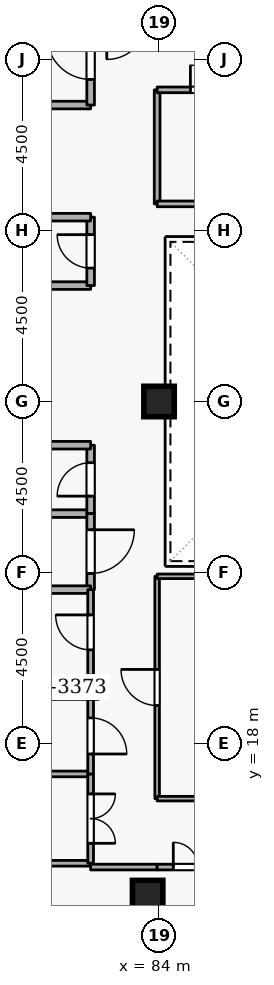
"""IFC4 building model, lengths in metres.
Left out: names, types, materials, properties, quantities, classifications, styles, units other than length and angle.
Written with IfcOpenShell. Run it as: python <this file> out.ifc"""

import sys

from ifc_helpers import new_model, si_unit, direction, frame, frame_2d, origin, origin_2d, place, context, subcontext, project, spatial, rectangle, extrude, element, fill, save


model = new_model("IFC4")
c1 = context("Model", 3, precision=1e-05, world=origin(), true_north=direction((0.0, 1.0)))
c2 = subcontext(c1, "Body", "Model", "MODEL_VIEW")
j1 = project(units=[si_unit("LENGTHUNIT", "METRE"), si_unit("PLANEANGLEUNIT", "RADIAN")], contexts=[c1])
p1 = place(None, origin())
s1 = spatial("IfcSite", under=j1, at=p1, CompositionType="ELEMENT")
p2 = place(p1, origin())
s2 = spatial("IfcBuilding", under=s1, at=p2, CompositionType="ELEMENT")
p3 = place(p2, frame((0.0, 0.0, 272.7)))
s3 = spatial("IfcBuildingStorey", under=s2, at=p3, CompositionType="ELEMENT", Elevation=272.7)
p4 = place(p3, frame((76.6, 19.45, 0.0), z_axis=(0.0, 0.0, 1.0), x_axis=(1.0, 0.0, 0.0)))
e1 = element("IfcWall", 1, at=p4, inside=s3, PredefinedType="SHEAR", context=c2, shape_type="SweptSolid", body=[
    extrude(rectangle(XDim=5.8, YDim=0.5, at=frame_2d((2.9, 0.0))), origin(), (0.0, 0.0, 1.0), 3.6),
])
for number, where, z_axis, x_axis in (
    (2, (83.7, 14.0, 0.0), (0.0, 0.0, 1.0), (1.0, 0.0, 0.0)),
    (3, (84.0, 27.0, 0.0), (0.0, 0.0, 1.0), (1.0, 0.0, 0.0)),
):
    element("IfcColumn", number, at=place(p3, frame(where, z_axis=z_axis, x_axis=x_axis)), inside=s3, PredefinedType="COLUMN", context=c2, shape_type="SweptSolid", body=[
        extrude(rectangle(XDim=0.8, YDim=0.8, at=origin_2d()), origin(), (0.0, 0.0, 1.0), 3.6),
    ])
p5 = place(p3, frame((79.9, 34.8, 0.0), z_axis=(0.0, 0.0, 1.0), x_axis=(1.0, 0.0, 0.0)))
e4 = element("IfcWall", 4, at=p5, inside=s3, PredefinedType="STANDARD", context=c2, shape_type="SweptSolid", body=[
    extrude(rectangle(XDim=2.3, YDim=0.2, at=frame_2d((1.15, 0.0))), origin(), (0.0, 0.0, 1.0), 2.545),
])
p6 = place(p3, frame((82.2, 34.8, 0.0), z_axis=(0.0, 0.0, 1.0), x_axis=(0.0, 1.0, 0.0)))
e5 = element("IfcWall", 5, at=p6, inside=s3, PredefinedType="STANDARD", context=c2, shape_type="SweptSolid", body=[
    extrude(rectangle(XDim=2.5, YDim=0.2, at=frame_2d((1.25, 0.0))), origin(), (0.0, 0.0, 1.0), 3.34),
])
p7 = place(p6, frame((0.675, 0.0, 0.0)))
e6 = element("IfcOpeningElement", 6, at=p7, cuts=e5, PredefinedType="OPENING", context=c2, shape_type="SweptSolid", body=[
    extrude(rectangle(XDim=1.15, YDim=2.1, at=frame_2d((0.575, 1.05))), frame((0.0, 0.11, 0.0), z_axis=(0.0, -1.0, 0.0), x_axis=(1.0, 0.0, 0.0)), (0.0, 0.0, 1.0), 0.22),
])
p8 = place(p3, frame((80.15, 24.05, 0.0), z_axis=(0.0, 0.0, 1.0), x_axis=(1.0, 0.0, 0.0)))
e7 = element("IfcWall", 7, at=p8, inside=s3, PredefinedType="STANDARD", context=c2, shape_type="SweptSolid", body=[
    extrude(rectangle(XDim=2.05, YDim=0.2, at=frame_2d((1.025, 0.0))), origin(), (0.0, 0.0, 1.0), 3.34),
])
p9 = place(p3, frame((82.2, 24.05, 0.0), z_axis=(0.0, 0.0, 1.0), x_axis=(0.0, 1.0, 0.0)))
e8 = element("IfcWall", 8, at=p9, inside=s3, PredefinedType="STANDARD", context=c2, shape_type="SweptSolid", body=[
    extrude(rectangle(XDim=1.8, YDim=0.2, at=frame_2d((0.9, 0.0))), origin(), (0.0, 0.0, 1.0), 3.34),
])
p10 = place(p9, frame((0.46, 0.0, 0.0)))
e9 = element("IfcOpeningElement", 9, at=p10, cuts=e8, PredefinedType="OPENING", context=c2, shape_type="SweptSolid", body=[
    extrude(rectangle(XDim=0.88, YDim=2.04, at=frame_2d((0.44, 1.02))), frame((0.0, 0.11, 0.0), z_axis=(0.0, -1.0, 0.0), x_axis=(1.0, 0.0, 0.0)), (0.0, 0.0, 1.0), 0.22),
])
for number, where, z_axis, x_axis in (
    (10, (82.2, 25.85, 0.0), (0.0, 0.0, 1.0), (-1.0, 0.0, 0.0)),
    (11, (80.15, 30.05, 0.0), (0.0, 0.0, 1.0), (1.0, 0.0, 0.0)),
):
    element("IfcWall", number, at=place(p3, frame(where, z_axis=z_axis, x_axis=x_axis)), inside=s3, PredefinedType="STANDARD", context=c2, shape_type="SweptSolid", body=[
        extrude(rectangle(XDim=2.05, YDim=0.2, at=frame_2d((1.025, 0.0))), origin(), (0.0, 0.0, 1.0), 3.34),
    ])
p11 = place(p3, frame((82.2, 30.05, 0.0), z_axis=(0.0, 0.0, 1.0), x_axis=(0.0, 1.0, 0.0)))
e12 = element("IfcWall", 12, at=p11, inside=s3, PredefinedType="STANDARD", context=c2, shape_type="SweptSolid", body=[
    extrude(rectangle(XDim=1.8, YDim=0.2, at=frame_2d((0.9, 0.0))), origin(), (0.0, 0.0, 1.0), 3.34),
])
p12 = place(p11, frame((0.46, 0.0, 0.0)))
e13 = element("IfcOpeningElement", 13, at=p12, cuts=e12, PredefinedType="OPENING", context=c2, shape_type="SweptSolid", body=[
    extrude(rectangle(XDim=0.88, YDim=2.04, at=frame_2d((0.44, 1.02))), frame((0.0, 0.11, 0.0), z_axis=(0.0, -1.0, 0.0), x_axis=(1.0, 0.0, 0.0)), (0.0, 0.0, 1.0), 0.22),
])
p13 = place(p3, frame((82.2, 31.85, 0.0), z_axis=(0.0, 0.0, 1.0), x_axis=(-1.0, 0.0, 0.0)))
e14 = element("IfcWall", 14, at=p13, inside=s3, PredefinedType="STANDARD", context=c2, shape_type="SweptSolid", body=[
    extrude(rectangle(XDim=2.05, YDim=0.2, at=frame_2d((1.025, 0.0))), origin(), (0.0, 0.0, 1.0), 3.34),
])
p14 = place(p3, frame((82.2, 24.05, 0.0), z_axis=(0.0, 0.0, 1.0), x_axis=(0.0, -1.0, 0.0)))
e15 = element("IfcWall", 15, at=p14, inside=s3, PredefinedType="STANDARD", context=c2, shape_type="SweptSolid", body=[
    extrude(rectangle(XDim=2.0, YDim=0.2, at=frame_2d((1.0, 0.0))), origin(), (0.0, 0.0, 1.0), 3.34),
])
p15 = place(p14, frame((0.425, 0.0, 0.0)))
e16 = element("IfcOpeningElement", 16, at=p15, cuts=e15, PredefinedType="OPENING", context=c2, shape_type="SweptSolid", body=[
    extrude(rectangle(XDim=1.15, YDim=2.1, at=frame_2d((0.575, 1.05))), frame((0.0, 0.11, 0.0), z_axis=(0.0, -1.0, 0.0), x_axis=(1.0, 0.0, 0.0)), (0.0, 0.0, 1.0), 0.22),
])
p16 = place(p3, frame((82.2, 22.05, 0.0), z_axis=(0.0, 0.0, 1.0), x_axis=(-1.0, 0.0, 0.0)))
e17 = element("IfcWall", 17, at=p16, inside=s3, PredefinedType="STANDARD", context=c2, shape_type="SweptSolid", body=[
    extrude(rectangle(XDim=2.05, YDim=0.2, at=frame_2d((1.025, 0.0))), origin(), (0.0, 0.0, 1.0), 3.34),
])
p17 = place(p3, frame((82.2, 19.8, 0.0), z_axis=(0.0, 0.0, 1.0), x_axis=(0.0, 1.0, 0.0)))
e18 = element("IfcWall", 18, at=p17, inside=s3, PredefinedType="PARTITIONING", context=c2, shape_type="SweptSolid", body=[
    extrude(rectangle(XDim=2.25, YDim=0.15, at=frame_2d((1.125, 0.0))), origin(), (0.0, 0.0, 1.0), 3.34),
])
p18 = place(p17, frame((0.665, 0.0, 0.0)))
e19 = element("IfcOpeningElement", 19, at=p18, cuts=e18, PredefinedType="OPENING", context=c2, shape_type="SweptSolid", body=[
    extrude(rectangle(XDim=0.92, YDim=2.08, at=frame_2d((0.46, 1.04))), frame((0.0, 0.085, 0.0), z_axis=(0.0, -1.0, 0.0), x_axis=(1.0, 0.0, 0.0)), (0.0, 0.0, 1.0), 0.17),
])
for number, where, z_axis, x_axis in (
    (20, (82.2, 14.85, 0.0), (0.0, 0.0, 1.0), (-1.0, 0.0, 0.0)),
    (21, (70.78, 17.2, 0.0), (0.0, 0.0, 1.0), (1.0, 0.0, 0.0)),
):
    element("IfcWall", number, at=place(p3, frame(where, z_axis=z_axis, x_axis=x_axis)), inside=s3, PredefinedType="PARTITIONING", context=c2, shape_type="SweptSolid", body=[
        extrude(rectangle(XDim=11.42, YDim=0.15, at=frame_2d((5.71, 0.0))), origin(), (0.0, 0.0, 1.0), 3.34),
    ])
p19 = place(p3, frame((82.2, 17.2, 0.0), z_axis=(0.0, 0.0, 1.0), x_axis=(0.0, -1.0, 0.0)))
e22 = element("IfcWall", 22, at=p19, inside=s3, PredefinedType="PARTITIONING", context=c2, shape_type="SweptSolid", body=[
    extrude(rectangle(XDim=2.35, YDim=0.15, at=frame_2d((1.175, 0.0))), origin(), (0.0, 0.0, 1.0), 3.34),
])
p20 = place(p19, frame((0.525, 0.0, 0.0)))
e23 = element("IfcOpeningElement", 23, at=p20, cuts=e22, PredefinedType="OPENING", context=c2, shape_type="SweptSolid", body=[
    extrude(rectangle(XDim=1.3, YDim=2.12, at=frame_2d((0.65, 1.06))), frame((0.0, 0.085, 0.0), z_axis=(0.0, -1.0, 0.0), x_axis=(1.0, 0.0, 0.0)), (0.0, 0.0, 1.0), 0.17),
])
p21 = place(p3, frame((82.2, 19.2, 0.0), z_axis=(0.0, 0.0, 1.0), x_axis=(0.0, -1.0, 0.0)))
e24 = element("IfcWall", 24, at=p21, inside=s3, PredefinedType="PARTITIONING", context=c2, shape_type="SweptSolid", body=[
    extrude(rectangle(XDim=2.0, YDim=0.15, at=frame_2d((1.0, 0.0))), origin(), (0.0, 0.0, 1.0), 3.34),
])
p22 = place(p21, frame((0.525, 0.0, 0.0)))
e25 = element("IfcOpeningElement", 25, at=p22, cuts=e24, PredefinedType="OPENING", context=c2, shape_type="SweptSolid", body=[
    extrude(rectangle(XDim=0.95, YDim=2.1, at=frame_2d((0.475, 1.05))), frame((0.0, 0.085, 0.0), z_axis=(0.0, -1.0, 0.0), x_axis=(1.0, 0.0, 0.0)), (0.0, 0.0, 1.0), 0.17),
])
p23 = place(p3, frame((82.2, 14.75, 0.0), z_axis=(0.0, 0.0, 1.0), x_axis=(1.0, 0.0, 0.0)))
e26 = element("IfcWall", 26, at=p23, inside=s3, PredefinedType="PARTITIONING", context=c2, shape_type="SweptSolid", body=[
    extrude(rectangle(XDim=1.75, YDim=0.15, at=frame_2d((0.875, 0.0))), origin(), (0.0, 0.0, 1.0), 3.34),
])
p24 = place(p3, frame((83.95, 14.75, 0.0), z_axis=(0.0, 0.0, 1.0), x_axis=(1.0, 0.0, 0.0)))
e27 = element("IfcWall", 27, at=p24, inside=s3, PredefinedType="PARTITIONING", context=c2, shape_type="SweptSolid", body=[
    extrude(rectangle(XDim=2.15, YDim=0.15, at=frame_2d((1.075, 0.0))), origin(), (0.0, 0.0, 1.0), 3.34),
])
p25 = place(p24, frame((0.425, 0.0, 0.0)))
e28 = element("IfcOpeningElement", 28, at=p25, cuts=e27, PredefinedType="OPENING", context=c2, shape_type="SweptSolid", body=[
    extrude(rectangle(XDim=1.3, YDim=2.12, at=frame_2d((0.65, 1.06))), frame((0.0, 0.085, 0.0), z_axis=(0.0, -1.0, 0.0), x_axis=(1.0, 0.0, 0.0)), (0.0, 0.0, 1.0), 0.17),
])
p26 = place(p3, frame((83.95, 16.55, 0.0), z_axis=(0.0, 0.0, 1.0), x_axis=(0.0, 1.0, 0.0)))
e29 = element("IfcWall", 29, at=p26, inside=s3, PredefinedType="PARTITIONING", context=c2, shape_type="SweptSolid", body=[
    extrude(rectangle(XDim=5.85, YDim=0.12, at=frame_2d((2.925, 0.0))), origin(), (0.0, 0.0, 1.0), 3.34),
])
p27 = place(p26, frame((2.45, 0.0, 0.0)))
e30 = element("IfcOpeningElement", 30, at=p27, cuts=e29, PredefinedType="OPENING", context=c2, shape_type="SweptSolid", body=[
    extrude(rectangle(XDim=0.95, YDim=2.1, at=frame_2d((0.475, 1.05))), frame((0.0, 0.07, 0.0), z_axis=(0.0, -1.0, 0.0), x_axis=(1.0, 0.0, 0.0)), (0.0, 0.0, 1.0), 0.14),
])
for number, where, z_axis, x_axis in (
    (31, (83.95, 22.4, 0.0), (0.0, 0.0, 1.0), (1.0, 0.0, 0.0)),
    (32, (89.3, 16.55, 0.0), (0.0, 0.0, 1.0), (-1.0, 0.0, 0.0)),
):
    element("IfcWall", number, at=place(p3, frame(where, z_axis=z_axis, x_axis=x_axis)), inside=s3, PredefinedType="PARTITIONING", context=c2, shape_type="SweptSolid", body=[
        extrude(rectangle(XDim=5.35, YDim=0.12, at=frame_2d((2.675, 0.0))), origin(), (0.0, 0.0, 1.0), 3.34),
    ])
p28 = place(p3, frame((83.95, 32.2, 0.0), z_axis=(0.0, 0.0, 1.0), x_axis=(0.0, 1.0, 0.0)))
e33 = element("IfcWall", 33, at=p28, inside=s3, PredefinedType="PARTITIONING", context=c2, shape_type="SweptSolid", body=[
    extrude(rectangle(XDim=3.0, YDim=0.15, at=frame_2d((1.5, 0.0))), origin(), (0.0, 0.0, 1.0), 3.34),
])
p29 = place(p3, frame((83.95, 35.2, 0.0), z_axis=(0.0, 0.0, 1.0), x_axis=(1.0, 0.0, 0.0)))
e34 = element("IfcWall", 34, at=p29, inside=s3, PredefinedType="PARTITIONING", context=c2, shape_type="SweptSolid", body=[
    extrude(rectangle(XDim=3.05, YDim=0.15, at=frame_2d((1.525, 0.0))), origin(), (0.0, 0.0, 1.0), 3.34),
])
p30 = place(p29, frame((0.875, 0.0, 0.0)))
e35 = element("IfcOpeningElement", 35, at=p30, cuts=e34, PredefinedType="OPENING", context=c2, shape_type="SweptSolid", body=[
    extrude(rectangle(XDim=1.3, YDim=2.12, at=frame_2d((0.65, 1.06))), frame((0.0, 0.085, 0.0), z_axis=(0.0, -1.0, 0.0), x_axis=(1.0, 0.0, 0.0)), (0.0, 0.0, 1.0), 0.17),
])
p31 = place(p3, frame((87.0, 32.2, 0.0), z_axis=(0.0, 0.0, 1.0), x_axis=(-1.0, 0.0, 0.0)))
e36 = element("IfcWall", 36, at=p31, inside=s3, PredefinedType="PARTITIONING", context=c2, shape_type="SweptSolid", body=[
    extrude(rectangle(XDim=3.05, YDim=0.15, at=frame_2d((1.525, 0.0))), origin(), (0.0, 0.0, 1.0), 3.34),
])
p32 = place(p7, origin())
e37 = element("IfcDoor", 37, at=p32, inside=s3, OperationType="SINGLE_SWING_RIGHT", PredefinedType="DOOR", context=c2, shape_type="SweptSolid", body=[
    extrude(rectangle(XDim=1.15, YDim=2.1, at=frame_2d((0.575, 1.05))), frame((0.0, 0.025, 0.0), z_axis=(0.0, -1.0, 0.0), x_axis=(1.0, 0.0, 0.0)), (0.0, 0.0, 1.0), 0.05),
])
fill(e6, e37)
p33 = place(p10, origin())
e38 = element("IfcDoor", 38, at=p33, inside=s3, OperationType="SINGLE_SWING_LEFT", PredefinedType="DOOR", context=c2, shape_type="SweptSolid", body=[
    extrude(rectangle(XDim=0.88, YDim=2.04, at=frame_2d((0.44, 1.02))), frame((0.0, 0.025, 0.0), z_axis=(0.0, -1.0, 0.0), x_axis=(1.0, 0.0, 0.0)), (0.0, 0.0, 1.0), 0.05),
])
fill(e9, e38)
p34 = place(p12, origin())
e39 = element("IfcDoor", 39, at=p34, inside=s3, OperationType="SINGLE_SWING_RIGHT", PredefinedType="DOOR", context=c2, shape_type="SweptSolid", body=[
    extrude(rectangle(XDim=0.88, YDim=2.04, at=frame_2d((0.44, 1.02))), frame((0.0, 0.025, 0.0), z_axis=(0.0, -1.0, 0.0), x_axis=(1.0, 0.0, 0.0)), (0.0, 0.0, 1.0), 0.05),
])
fill(e13, e39)
p35 = place(p18, origin())
e40 = element("IfcDoor", 40, at=p35, inside=s3, OperationType="SINGLE_SWING_RIGHT", PredefinedType="DOOR", context=c2, shape_type="SweptSolid", body=[
    extrude(rectangle(XDim=0.92, YDim=2.08, at=frame_2d((0.46, 1.04))), frame((0.0, 0.025, 0.0), z_axis=(0.0, -1.0, 0.0), x_axis=(1.0, 0.0, 0.0)), (0.0, 0.0, 1.0), 0.05),
])
fill(e19, e40)
p36 = place(p15, origin())
e41 = element("IfcDoor", 41, at=p36, inside=s3, OperationType="SINGLE_SWING_LEFT", PredefinedType="DOOR", context=c2, shape_type="SweptSolid", body=[
    extrude(rectangle(XDim=1.15, YDim=2.1, at=frame_2d((0.575, 1.05))), frame((0.0, 0.025, 0.0), z_axis=(0.0, -1.0, 0.0), x_axis=(1.0, 0.0, 0.0)), (0.0, 0.0, 1.0), 0.05),
])
fill(e16, e41)
p37 = place(p20, origin())
e42 = element("IfcDoor", 42, at=p37, inside=s3, OperationType="DOUBLE_DOOR_SINGLE_SWING", PredefinedType="DOOR", context=c2, shape_type="SweptSolid", body=[
    extrude(rectangle(XDim=1.3, YDim=2.12, at=frame_2d((0.65, 1.06))), frame((0.0, 0.025, 0.0), z_axis=(0.0, -1.0, 0.0), x_axis=(1.0, 0.0, 0.0)), (0.0, 0.0, 1.0), 0.05),
])
fill(e23, e42)
p38 = place(p22, origin())
e43 = element("IfcDoor", 43, at=p38, inside=s3, OperationType="SINGLE_SWING_RIGHT", PredefinedType="DOOR", context=c2, shape_type="SweptSolid", body=[
    extrude(rectangle(XDim=0.95, YDim=2.1, at=frame_2d((0.475, 1.05))), frame((0.0, 0.025, 0.0), z_axis=(0.0, -1.0, 0.0), x_axis=(1.0, 0.0, 0.0)), (0.0, 0.0, 1.0), 0.05),
])
fill(e25, e43)
p39 = place(p25, origin())
e44 = element("IfcDoor", 44, at=p39, inside=s3, OperationType="DOUBLE_DOOR_SINGLE_SWING", PredefinedType="DOOR", context=c2, shape_type="SweptSolid", body=[
    extrude(rectangle(XDim=1.3, YDim=2.12, at=frame_2d((0.65, 1.06))), frame((0.0, 0.025, 0.0), z_axis=(0.0, -1.0, 0.0), x_axis=(1.0, 0.0, 0.0)), (0.0, 0.0, 1.0), 0.05),
])
fill(e28, e44)
p40 = place(p27, origin())
e45 = element("IfcDoor", 45, at=p40, inside=s3, OperationType="SINGLE_SWING_RIGHT", PredefinedType="DOOR", context=c2, shape_type="SweptSolid", body=[
    extrude(rectangle(XDim=0.95, YDim=2.1, at=frame_2d((0.475, 1.05))), frame((0.0, 0.025, 0.0), z_axis=(0.0, -1.0, 0.0), x_axis=(1.0, 0.0, 0.0)), (0.0, 0.0, 1.0), 0.05),
])
fill(e30, e45)
p41 = place(p30, origin())
e46 = element("IfcDoor", 46, at=p41, inside=s3, OperationType="DOUBLE_DOOR_SINGLE_SWING", PredefinedType="DOOR", context=c2, shape_type="SweptSolid", body=[
    extrude(rectangle(XDim=1.3, YDim=2.12, at=frame_2d((0.65, 1.06))), frame((0.0, 0.025, 0.0), z_axis=(0.0, -1.0, 0.0), x_axis=(1.0, 0.0, 0.0)), (0.0, 0.0, 1.0), 0.05),
])
fill(e35, e46)
save(model, sys.argv[1])
